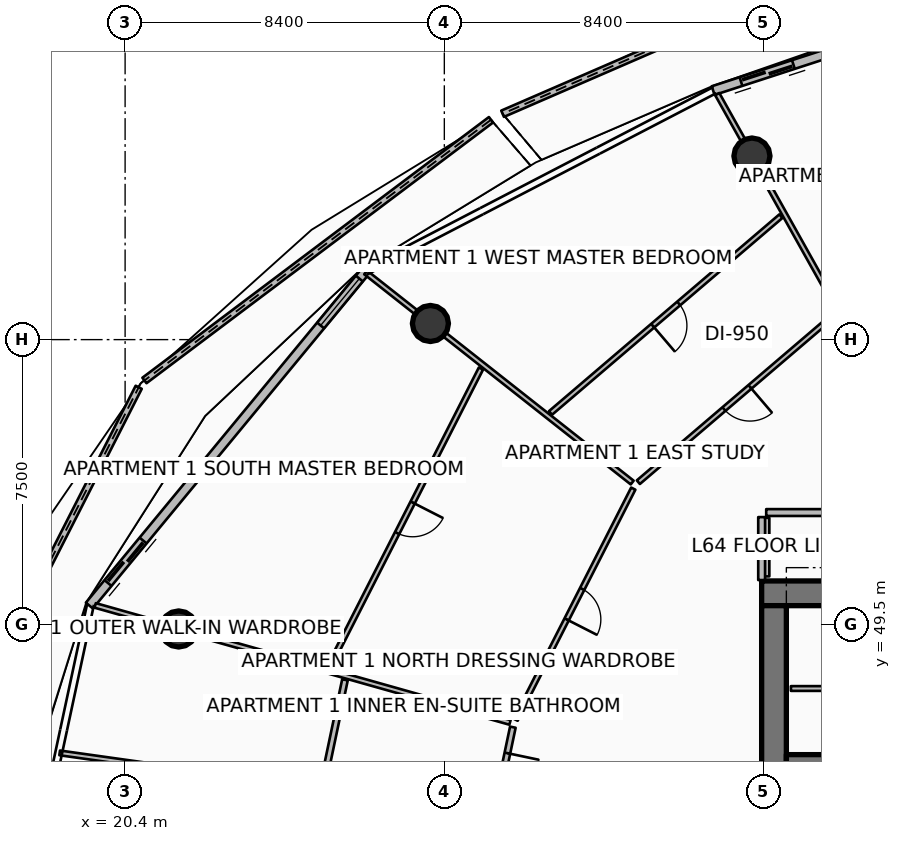
"""IFC4 building model, lengths in metres.
Left out: names, types, materials, properties, quantities, classifications, styles, units other than length and angle.
Written with IfcOpenShell. Run it as: python <this file> out.ifc"""

import sys

from ifc_helpers import new_model, si_unit, direction, frame, frame_2d, origin, origin_2d, place, context, subcontext, project, spatial, polyline, rectangle, circle, outline, extrude, element, fill, save


model = new_model("IFC4")
c1 = context("Model", 3, precision=1e-05, world=origin(), true_north=direction((0.0, 1.0)))
c2 = subcontext(c1, "Body", "Model", "MODEL_VIEW")
j1 = project(units=[si_unit("LENGTHUNIT", "METRE"), si_unit("PLANEANGLEUNIT", "RADIAN")], contexts=[c1])
p1 = place(None, origin())
s1 = spatial("IfcSite", under=j1, at=p1, CompositionType="ELEMENT")
p2 = place(p1, origin())
s2 = spatial("IfcBuilding", under=s1, at=p2, CompositionType="ELEMENT")
p3 = place(p2, frame((0.0, 0.0, 255.95)))
s3 = spatial("IfcBuildingStorey", under=s2, at=p3, CompositionType="ELEMENT", Elevation=255.95)
p4 = place(p3, frame((37.15, 50.325, 0.0), z_axis=(0.0, 0.0, 1.0), x_axis=(1.0, 0.0, 0.0)))
e1 = element("IfcWall", 1, at=p4, inside=s3, PredefinedType="SHEAR", context=c2, shape_type="SweptSolid", body=[
    extrude(rectangle(XDim=9.75, YDim=0.65, at=frame_2d((4.875, 0.0))), origin(), (0.0, 0.0, 1.0), 3.85),
])
p5 = place(p3, frame((37.475, 34.0, 0.0), z_axis=(0.0, 0.0, 1.0), x_axis=(0.0, 1.0, 0.0)))
e2 = element("IfcWall", 2, at=p5, inside=s3, PredefinedType="SHEAR", context=c2, shape_type="SweptSolid", body=[
    extrude(rectangle(XDim=16.0, YDim=0.65, at=frame_2d((8.0, 0.0))), origin(), (0.0, 0.0, 1.0), 3.85),
])
p6 = place(p3, frame((37.8, 45.94, 0.0), z_axis=(0.0, 0.0, 1.0), x_axis=(1.0, 0.0, 0.0)))
e3 = element("IfcWall", 3, at=p6, inside=s3, PredefinedType="SHEAR", context=c2, shape_type="SweptSolid", body=[
    extrude(rectangle(XDim=3.5, YDim=0.28, at=frame_2d((1.75, 0.0))), origin(), (0.0, 0.0, 1.0), 3.85),
])
for number, where, z_axis, x_axis in (
    (4, (36.895, 61.83, 0.0), (0.0, 0.0, 1.0), (1.0, 0.0, 0.0)),
    (5, (28.434, 57.425, 0.0), (0.0, 0.0, 1.0), (1.0, 0.0, 0.0)),
    (6, (21.809, 49.387, 0.0), (0.0, 0.0, 1.0), (1.0, 0.0, 0.0)),
):
    element("IfcColumn", number, at=place(p3, frame(where, z_axis=z_axis, x_axis=x_axis)), inside=s3, PredefinedType="COLUMN", context=c2, shape_type="SweptSolid", body=[
        extrude(circle(Radius=0.475, at=origin_2d()), origin(), (0.0, 0.0, 1.0), 3.59),
    ])
p7 = place(p3, frame((39.743, 67.026, 0.0), z_axis=(0.0, 0.0, 1.0), x_axis=(-0.917372888721, -0.398028872119, 0.0)))
e7 = element("IfcWall", 7, at=p7, inside=s3, PredefinedType="PARAPET", context=c2, shape_type="SweptSolid", body=[
    extrude(outline(polyline([(0.0, 0.0), (10.258, 0.0), (10.257, 1.12), (5.129, 1.182), (0.0, 1.348), (0.0, 0.0)])), frame((0.0, 0.09, 0.0), z_axis=(0.0, -1.0, 0.0), x_axis=(1.0, 0.0, 0.0)), (0.0, 0.0, 1.0), 0.18),
])
p8 = place(p3, frame((30.028, 62.784, 0.0), z_axis=(0.0, 0.0, 1.0), x_axis=(-0.799146815098, -0.601135898046, 0.0)))
e8 = element("IfcWall", 8, at=p8, inside=s3, PredefinedType="PARAPET", context=c2, shape_type="SweptSolid", body=[
    extrude(outline(polyline([(0.0, 0.0), (11.411, 0.0), (11.411, 1.348), (5.706, 1.182), (0.0, 1.12), (0.0, 0.0)])), frame((0.0, 0.09, 0.0), z_axis=(0.0, -1.0, 0.0), x_axis=(1.0, 0.0, 0.0)), (0.0, 0.0, 1.0), 0.18),
])
p9 = place(p3, frame((20.758, 55.746, 0.0), z_axis=(0.0, 0.0, 1.0), x_axis=(-0.45375182612, -0.891128094211, 0.0)))
e9 = element("IfcWall", 9, at=p9, inside=s3, PredefinedType="PARAPET", context=c2, shape_type="SweptSolid", body=[
    extrude(outline(polyline([(0.0, 0.0), (12.3, 0.0), (12.3, 1.747), (6.15, 1.562), (0.0, 1.348), (0.0, 0.0)])), frame((0.0, 0.09, 0.0), z_axis=(0.0, -1.0, 0.0), x_axis=(1.0, 0.0, 0.0)), (0.0, 0.0, 1.0), 0.18),
])
p10 = place(p3, frame((45.142, 66.564, 0.0), z_axis=(0.0, 0.0, 1.0), x_axis=(-0.951055974609, -0.309018661507, 0.0)))
e10 = element("IfcWall", 10, at=p10, inside=s3, PredefinedType="SOLIDWALL", context=c2, shape_type="SweptSolid", body=[
    extrude(rectangle(XDim=9.745, YDim=0.24, at=frame_2d((4.873, 0.0))), origin(), (0.0, 0.0, 1.0), 2.54),
])
p11 = place(p10, frame((7.525, 0.0, 0.0)))
e11 = element("IfcOpeningElement", 11, at=p11, cuts=e10, PredefinedType="OPENING", context=c2, shape_type="SweptSolid", body=[
    extrude(rectangle(XDim=1.45, YDim=2.15, at=frame_2d((0.725, 1.075))), frame((0.0, 0.13, 0.0), z_axis=(0.0, -1.0, 0.0), x_axis=(1.0, 0.0, 0.0)), (0.0, 0.0, 1.0), 0.26),
])
p12 = place(p10, frame((0.28, 0.0, 0.65)))
e12 = element("IfcOpeningElement", 12, at=p12, cuts=e10, PredefinedType="OPENING", context=c2, shape_type="SweptSolid", body=[
    extrude(rectangle(XDim=1.6, YDim=1.5, at=frame_2d((0.8, 0.75))), frame((0.0, 0.13, 0.0), z_axis=(0.0, -1.0, 0.0), x_axis=(1.0, 0.0, 0.0)), (0.0, 0.0, 1.0), 0.26),
])
p13 = place(p3, frame((26.742, 58.822, 0.0), z_axis=(0.0, 0.0, 1.0), x_axis=(-0.636680093065, -0.771128043255, 0.0)))
e13 = element("IfcWall", 13, at=p13, inside=s3, PredefinedType="SOLIDWALL", context=c2, shape_type="SweptSolid", body=[
    extrude(rectangle(XDim=11.438, YDim=0.24, at=frame_2d((5.719, 0.0))), origin(), (0.0, 0.0, 1.0), 2.54),
])
p14 = place(p13, frame((9.218, 0.0, 0.0)))
e14 = element("IfcOpeningElement", 14, at=p14, cuts=e13, PredefinedType="OPENING", context=c2, shape_type="SweptSolid", body=[
    extrude(rectangle(XDim=1.45, YDim=2.15, at=frame_2d((0.725, 1.075))), frame((0.0, 0.13, 0.0), z_axis=(0.0, -1.0, 0.0), x_axis=(1.0, 0.0, 0.0)), (0.0, 0.0, 1.0), 0.26),
])
p15 = place(p13, frame((0.28, 0.0, 0.65)))
e15 = element("IfcOpeningElement", 15, at=p15, cuts=e13, PredefinedType="OPENING", context=c2, shape_type="SweptSolid", body=[
    extrude(rectangle(XDim=1.6, YDim=1.5, at=frame_2d((0.8, 0.75))), frame((0.0, 0.13, 0.0), z_axis=(0.0, -1.0, 0.0), x_axis=(1.0, 0.0, 0.0)), (0.0, 0.0, 1.0), 0.26),
])
p16 = place(p3, frame((37.92, 47.82, 0.0), z_axis=(0.0, 0.0, 1.0), x_axis=(1.0, 0.0, 0.0)))
e16 = element("IfcWall", 16, at=p16, inside=s3, PredefinedType="PARTITIONING", context=c2, shape_type="SweptSolid", body=[
    extrude(rectangle(XDim=4.08, YDim=0.125, at=frame_2d((2.04, 0.0))), origin(), (0.0, 0.0, 1.0), 3.03),
])
p17 = place(p16, frame((1.615, 0.0, 0.0)))
e17 = element("IfcOpeningElement", 17, at=p17, cuts=e16, PredefinedType="OPENING", context=c2, shape_type="SweptSolid", body=[
    extrude(rectangle(XDim=0.85, YDim=2.06, at=frame_2d((0.425, 1.03))), frame((0.0, 0.073, 0.0), z_axis=(0.0, -1.0, 0.0), x_axis=(1.0, 0.0, 0.0)), (0.0, 0.0, 1.0), 0.145),
])
p18 = place(p3, frame((37.29, 50.77, 0.0), z_axis=(0.0, 0.0, 1.0), x_axis=(0.0, 1.0, 0.0)))
e18 = element("IfcWall", 18, at=p18, inside=s3, PredefinedType="PARTITIONING", context=c2, shape_type="SweptSolid", body=[
    extrude(rectangle(XDim=1.54, YDim=0.125, at=frame_2d((0.77, 0.0))), origin(), (0.0, 0.0, 1.0), 3.03),
])
p19 = place(p3, frame((42.028, 52.45, 0.0), z_axis=(0.0, 0.0, 1.0), x_axis=(-1.0, 0.0, 0.0)))
e19 = element("IfcWall", 19, at=p19, inside=s3, PredefinedType="PARTITIONING", context=c2, shape_type="SweptSolid", body=[
    extrude(rectangle(XDim=4.758, YDim=0.18, at=frame_2d((2.379, 0.0))), origin(), (0.0, 0.0, 1.0), 2.957),
])
p20 = place(p3, frame((37.15, 52.33, 0.0), z_axis=(0.0, 0.0, 1.0), x_axis=(0.0, -1.0, 0.0)))
e20 = element("IfcWall", 20, at=p20, inside=s3, PredefinedType="PARTITIONING", context=c2, shape_type="SweptSolid", body=[
    extrude(rectangle(XDim=1.656, YDim=0.18, at=frame_2d((0.828, 0.0))), origin(), (0.0, 0.0, 1.0), 2.957),
])
p21 = place(p3, frame((39.129, 57.839, 0.0), z_axis=(0.0, 0.0, 1.0), x_axis=(-0.488617220279, 0.872498259051, 0.0)))
e21 = element("IfcWall", 21, at=p21, inside=s3, PredefinedType="PARTITIONING", context=c2, shape_type="SweptSolid", body=[
    extrude(rectangle(XDim=6.441, YDim=0.125, at=frame_2d((3.22, 0.0))), origin(), (0.0, 0.0, 1.0), 2.957),
])
p22 = place(p3, frame((39.095, 57.681, 0.0), z_axis=(0.0, 0.0, 1.0), x_axis=(-0.760396866349, -0.649458702033, 0.0)))
e22 = element("IfcWall", 22, at=p22, inside=s3, PredefinedType="PARTITIONING", context=c2, shape_type="SweptSolid", body=[
    extrude(rectangle(XDim=6.824, YDim=0.125, at=frame_2d((3.412, 0.0))), origin(), (0.0, 0.0, 1.0), 2.957),
])
p23 = place(p22, frame((2.962, 0.0, 0.0)))
e23 = element("IfcOpeningElement", 23, at=p23, cuts=e22, PredefinedType="OPENING", context=c2, shape_type="SweptSolid", body=[
    extrude(rectangle(XDim=0.9, YDim=2.08, at=frame_2d((0.45, 1.04))), frame((0.0, 0.073, 0.0), z_axis=(0.0, -1.0, 0.0), x_axis=(1.0, 0.0, 0.0)), (0.0, 0.0, 1.0), 0.145),
])
p24 = place(p3, frame((37.657, 60.248, 0.0), z_axis=(0.0, 0.0, 1.0), x_axis=(-0.76041400447, -0.649438635905, 0.0)))
e24 = element("IfcWall", 24, at=p24, inside=s3, PredefinedType="PARTITIONING", context=c2, shape_type="SweptSolid", body=[
    extrude(rectangle(XDim=7.973, YDim=0.125, at=frame_2d((3.986, 0.0))), origin(), (0.0, 0.0, 1.0), 2.957),
])
p25 = place(p24, frame((3.536, 0.0, 0.0)))
e25 = element("IfcOpeningElement", 25, at=p25, cuts=e24, PredefinedType="OPENING", context=c2, shape_type="SweptSolid", body=[
    extrude(rectangle(XDim=0.9, YDim=2.08, at=frame_2d((0.45, 1.04))), frame((0.0, 0.073, 0.0), z_axis=(0.0, -1.0, 0.0), x_axis=(1.0, 0.0, 0.0)), (0.0, 0.0, 1.0), 0.145),
])
p26 = place(p3, frame((33.743, 53.239, 0.0), z_axis=(0.0, 0.0, 1.0), x_axis=(-0.785324118062, 0.619084832305, 0.0)))
e26 = element("IfcWall", 26, at=p26, inside=s3, PredefinedType="PARTITIONING", context=c2, shape_type="SweptSolid", body=[
    extrude(rectangle(XDim=8.931, YDim=0.125, at=frame_2d((4.465, 0.0))), origin(), (0.0, 0.0, 1.0), 2.957),
])
p27 = place(p3, frame((33.772, 53.079, 0.0), z_axis=(0.0, 0.0, 1.0), x_axis=(-0.454012060349, -0.890995538181, 0.0)))
e27 = element("IfcWall", 27, at=p27, inside=s3, PredefinedType="PARTITIONING", context=c2, shape_type="SweptSolid", body=[
    extrude(rectangle(XDim=6.824, YDim=0.125, at=frame_2d((3.412, 0.0))), origin(), (0.0, 0.0, 1.0), 2.957),
])
p28 = place(p27, frame((2.962, 0.0, 0.0)))
e28 = element("IfcOpeningElement", 28, at=p28, cuts=e27, PredefinedType="OPENING", context=c2, shape_type="SweptSolid", body=[
    extrude(rectangle(XDim=0.9, YDim=2.08, at=frame_2d((0.45, 1.04))), frame((0.0, 0.073, 0.0), z_axis=(0.0, -1.0, 0.0), x_axis=(1.0, 0.0, 0.0)), (0.0, 0.0, 1.0), 0.145),
])
p29 = place(p3, frame((29.764, 56.239, 0.0), z_axis=(0.0, 0.0, 1.0), x_axis=(-0.453980126594, -0.891011809494, 0.0)))
e29 = element("IfcWall", 29, at=p29, inside=s3, PredefinedType="PARTITIONING", context=c2, shape_type="SweptSolid", body=[
    extrude(rectangle(XDim=8.816, YDim=0.125, at=frame_2d((4.408, 0.0))), origin(), (0.0, 0.0, 1.0), 2.957),
])
p30 = place(p29, frame((3.958, 0.0, 0.0)))
e30 = element("IfcOpeningElement", 30, at=p30, cuts=e29, PredefinedType="OPENING", context=c2, shape_type="SweptSolid", body=[
    extrude(rectangle(XDim=0.9, YDim=2.08, at=frame_2d((0.45, 1.04))), frame((0.0, 0.073, 0.0), z_axis=(0.0, -1.0, 0.0), x_axis=(1.0, 0.0, 0.0)), (0.0, 0.0, 1.0), 0.145),
])
p31 = place(p3, frame((30.528, 46.928, 0.0), z_axis=(0.0, 0.0, 1.0), x_axis=(-0.962454146261, 0.271444315367, 0.0)))
e31 = element("IfcWall", 31, at=p31, inside=s3, PredefinedType="PARTITIONING", context=c2, shape_type="SweptSolid", body=[
    extrude(rectangle(XDim=11.342, YDim=0.125, at=frame_2d((5.671, 0.0))), origin(), (0.0, 0.0, 1.0), 2.957),
])
p32 = place(p3, frame((30.603, 46.803, 0.0), z_axis=(0.0, 0.0, 1.0), x_axis=(-0.205906433606, -0.978571683935, 0.0)))
e32 = element("IfcWall", 32, at=p32, inside=s3, PredefinedType="PARTITIONING", context=c2, shape_type="SweptSolid", body=[
    extrude(rectangle(XDim=2.247, YDim=0.15, at=frame_2d((1.124, 0.0))), origin(), (0.0, 0.0, 1.0), 2.957),
])
p33 = place(p32, frame((0.698, 0.0, 0.0)))
e33 = element("IfcOpeningElement", 33, at=p33, cuts=e32, PredefinedType="OPENING", context=c2, shape_type="SweptSolid", body=[
    extrude(rectangle(XDim=0.85, YDim=2.06, at=frame_2d((0.425, 1.03))), frame((0.0, 0.085, 0.0), z_axis=(0.0, -1.0, 0.0), x_axis=(1.0, 0.0, 0.0)), (0.0, 0.0, 1.0), 0.17),
])
p34 = place(p3, frame((26.186, 48.049, 0.0), z_axis=(0.0, 0.0, 1.0), x_axis=(-0.205851663269, -0.97858320685, 0.0)))
e34 = element("IfcWall", 34, at=p34, inside=s3, PredefinedType="PARTITIONING", context=c2, shape_type="SweptSolid", body=[
    extrude(rectangle(XDim=2.866, YDim=0.15, at=frame_2d((1.433, 0.0))), origin(), (0.0, 0.0, 1.0), 2.957),
])
p35 = place(p3, frame((25.488, 45.168, 0.0), z_axis=(0.0, 0.0, 1.0), x_axis=(-0.990239896804, 0.139373407717, 0.0)))
e35 = element("IfcWall", 35, at=p35, inside=s3, PredefinedType="PARTITIONING", context=c2, shape_type="SweptSolid", body=[
    extrude(rectangle(XDim=6.877, YDim=0.125, at=frame_2d((3.438, 0.0))), origin(), (0.0, 0.0, 1.0), 3.03),
])
p36 = place(p35, frame((3.014, 0.0, 0.0)))
e36 = element("IfcOpeningElement", 36, at=p36, cuts=e35, PredefinedType="OPENING", context=c2, shape_type="SweptSolid", body=[
    extrude(rectangle(XDim=0.85, YDim=2.06, at=frame_2d((0.425, 1.03))), frame((0.0, 0.073, 0.0), z_axis=(0.0, -1.0, 0.0), x_axis=(1.0, 0.0, 0.0)), (0.0, 0.0, 1.0), 0.145),
])
p37 = place(p11, origin())
e37 = element("IfcDoor", 37, at=p37, inside=s3, OperationType="DOUBLE_DOOR_SLIDING", PredefinedType="DOOR", context=c2, shape_type="SweptSolid", body=[
    extrude(rectangle(XDim=1.45, YDim=2.15, at=frame_2d((0.725, 1.075))), frame((0.0, 0.025, 0.0), z_axis=(0.0, -1.0, 0.0), x_axis=(1.0, 0.0, 0.0)), (0.0, 0.0, 1.0), 0.05),
])
fill(e11, e37)
p38 = place(p14, origin())
e38 = element("IfcDoor", 38, at=p38, inside=s3, OperationType="DOUBLE_DOOR_SLIDING", PredefinedType="DOOR", context=c2, shape_type="SweptSolid", body=[
    extrude(rectangle(XDim=1.45, YDim=2.15, at=frame_2d((0.725, 1.075))), frame((0.0, 0.025, 0.0), z_axis=(0.0, -1.0, 0.0), x_axis=(1.0, 0.0, 0.0)), (0.0, 0.0, 1.0), 0.05),
])
fill(e14, e38)
p39 = place(p15, origin())
e39 = element("IfcWindow", 39, at=p39, inside=s3, PartitioningType="SINGLE_PANEL", PredefinedType="WINDOW", context=c2, shape_type="SweptSolid", body=[
    extrude(rectangle(XDim=1.6, YDim=1.5, at=frame_2d((0.8, 0.75))), frame((0.0, 0.03, 0.0), z_axis=(0.0, -1.0, 0.0), x_axis=(1.0, 0.0, 0.0)), (0.0, 0.0, 1.0), 0.06),
])
fill(e15, e39)
p40 = place(p23, origin())
e40 = element("IfcDoor", 40, at=p40, inside=s3, OperationType="SINGLE_SWING_LEFT", PredefinedType="DOOR", context=c2, shape_type="SweptSolid", body=[
    extrude(rectangle(XDim=0.9, YDim=2.08, at=frame_2d((0.45, 1.04))), frame((0.0, 0.025, 0.0), z_axis=(0.0, -1.0, 0.0), x_axis=(1.0, 0.0, 0.0)), (0.0, 0.0, 1.0), 0.05),
])
fill(e23, e40)
p41 = place(p25, origin())
e41 = element("IfcDoor", 41, at=p41, inside=s3, OperationType="SINGLE_SWING_RIGHT", PredefinedType="DOOR", context=c2, shape_type="SweptSolid", body=[
    extrude(rectangle(XDim=0.9, YDim=2.08, at=frame_2d((0.45, 1.04))), frame((0.0, 0.025, 0.0), z_axis=(0.0, -1.0, 0.0), x_axis=(1.0, 0.0, 0.0)), (0.0, 0.0, 1.0), 0.05),
])
fill(e25, e41)
p42 = place(p28, origin())
e42 = element("IfcDoor", 42, at=p42, inside=s3, OperationType="SINGLE_SWING_RIGHT", PredefinedType="DOOR", context=c2, shape_type="SweptSolid", body=[
    extrude(rectangle(XDim=0.9, YDim=2.08, at=frame_2d((0.45, 1.04))), frame((0.0, 0.025, 0.0), z_axis=(0.0, -1.0, 0.0), x_axis=(1.0, 0.0, 0.0)), (0.0, 0.0, 1.0), 0.05),
])
fill(e28, e42)
p43 = place(p30, origin())
e43 = element("IfcDoor", 43, at=p43, inside=s3, OperationType="SINGLE_SWING_LEFT", PredefinedType="DOOR", context=c2, shape_type="SweptSolid", body=[
    extrude(rectangle(XDim=0.9, YDim=2.08, at=frame_2d((0.45, 1.04))), frame((0.0, 0.025, 0.0), z_axis=(0.0, -1.0, 0.0), x_axis=(1.0, 0.0, 0.0)), (0.0, 0.0, 1.0), 0.05),
])
fill(e30, e43)
p44 = place(p33, origin())
e44 = element("IfcDoor", 44, at=p44, inside=s3, OperationType="SINGLE_SWING_LEFT", PredefinedType="DOOR", context=c2, shape_type="SweptSolid", body=[
    extrude(rectangle(XDim=0.85, YDim=2.06, at=frame_2d((0.425, 1.03))), frame((0.0, 0.025, 0.0), z_axis=(0.0, -1.0, 0.0), x_axis=(1.0, 0.0, 0.0)), (0.0, 0.0, 1.0), 0.05),
])
fill(e33, e44)
save(model, sys.argv[1])
